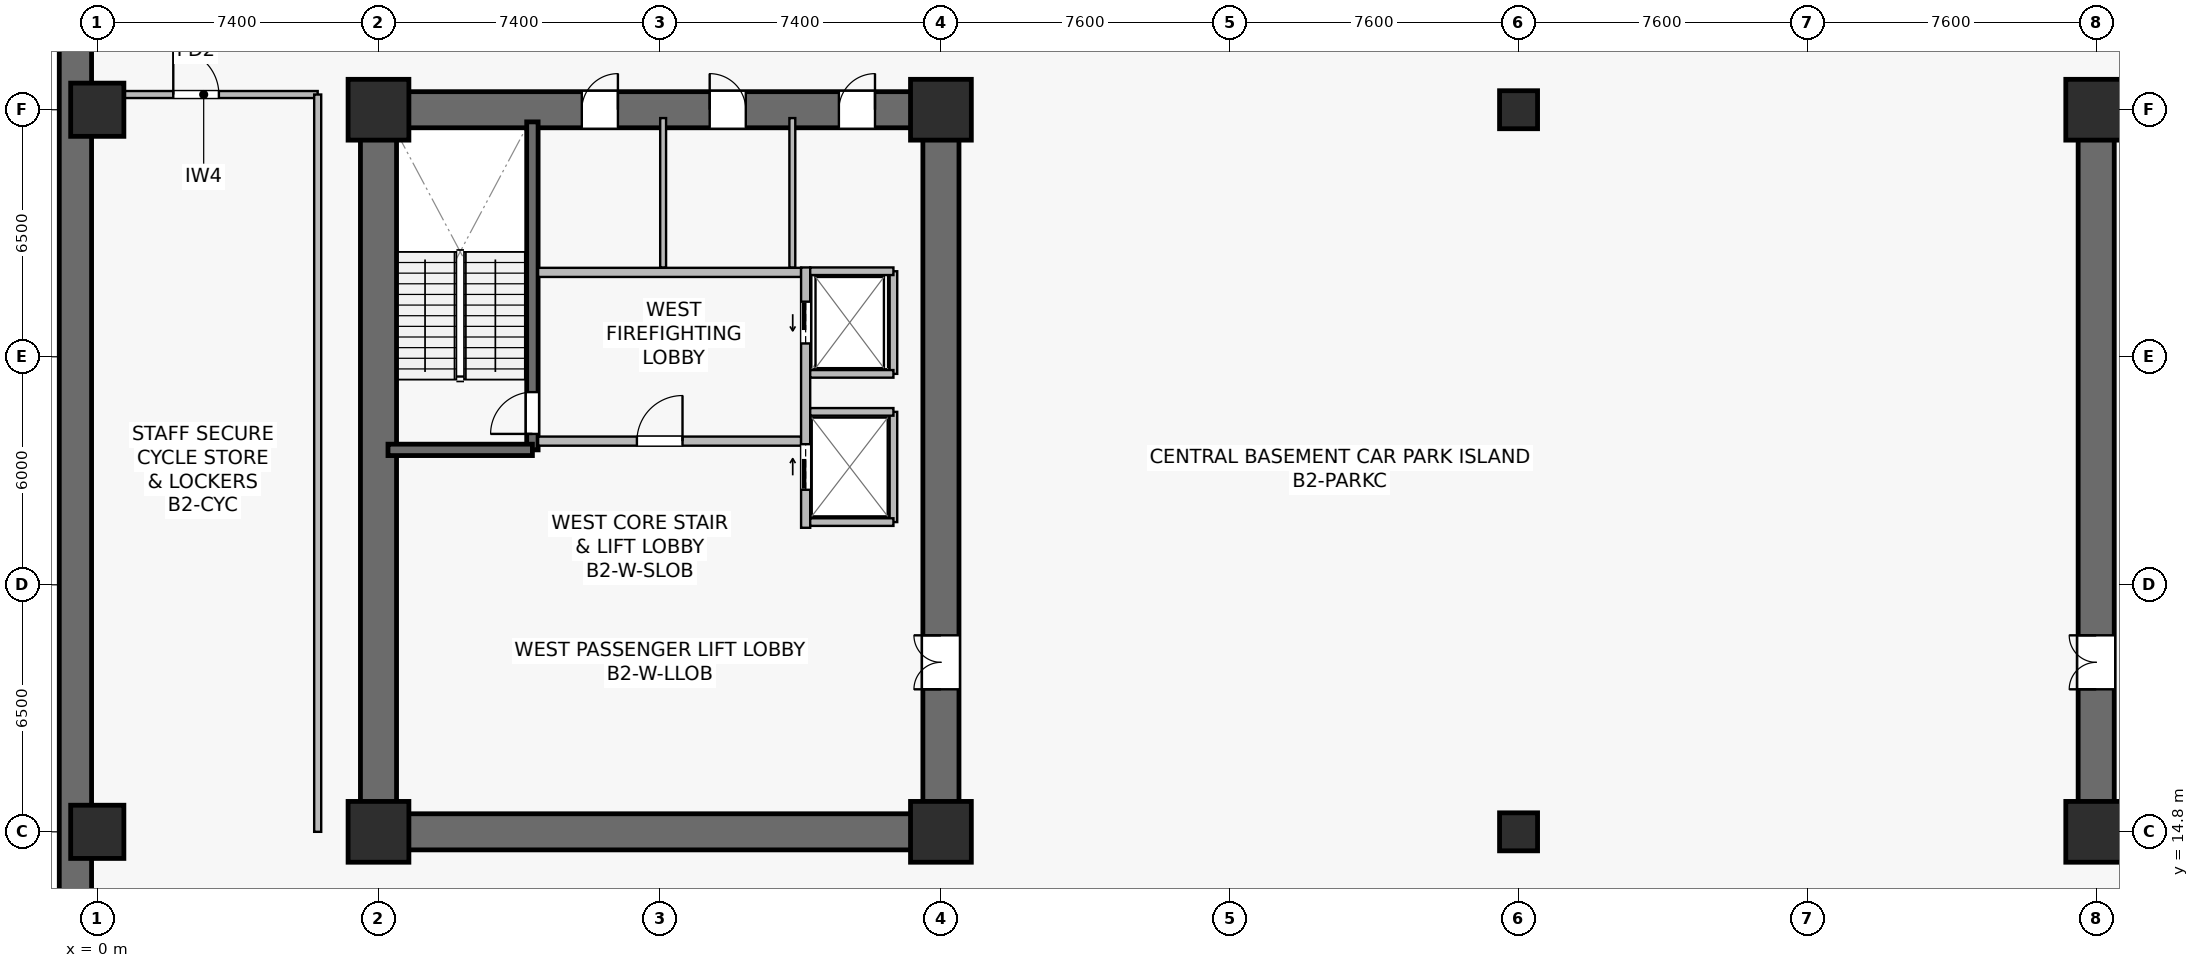
"""IFC4 building model, lengths in metres.
Left out: names, types, materials, properties, quantities, classifications, styles, units other than length and angle.
Written with IfcOpenShell. Run it as: python <this file> out.ifc"""

import sys

from ifc_helpers import new_model, si_unit, direction, frame, frame_2d, origin, origin_2d, place, context, subcontext, project, spatial, rectangle, extrude, source, transform, mapped, element, fill, save


model = new_model("IFC4")
c1 = context("Model", 3, precision=1e-05, world=origin(), true_north=direction((0.0, 1.0)))
c2 = subcontext(c1, "Body", "Model", "MODEL_VIEW")
j1 = project(units=[si_unit("LENGTHUNIT", "METRE"), si_unit("PLANEANGLEUNIT", "RADIAN")], contexts=[c1])
p1 = place(None, origin())
s1 = spatial("IfcSite", under=j1, at=p1, CompositionType="ELEMENT")
p2 = place(p1, origin())
s2 = spatial("IfcBuilding", under=s1, at=p2, CompositionType="ELEMENT")
p3 = place(p2, frame((0.0, 0.0, -9.6)))
s3 = spatial("IfcBuildingStorey", under=s2, at=p3, CompositionType="ELEMENT", Elevation=-9.6)
p4 = place(p3, frame((6.925, 14.8, 0.0), z_axis=(0.0, 0.0, 1.0), x_axis=(1.0, 0.0, 0.0)))
e1 = element("IfcWall", 1, at=p4, inside=s3, PredefinedType="SHEAR", context=c2, shape_type="SweptSolid", body=[
    extrude(rectangle(XDim=15.75, YDim=0.95, at=frame_2d((7.875, 0.0))), origin(), (0.0, 0.0, 1.0), 4.42),
])
p5 = place(p3, frame((6.925, 33.8, 0.0), z_axis=(0.0, 0.0, 1.0), x_axis=(1.0, 0.0, 0.0)))
e2 = element("IfcWall", 2, at=p5, inside=s3, PredefinedType="SHEAR", context=c2, shape_type="SweptSolid", body=[
    extrude(rectangle(XDim=15.75, YDim=0.95, at=frame_2d((7.875, 0.0))), origin(), (0.0, 0.0, 1.0), 4.42),
])
p6 = place(p5, frame((5.825, 0.0, 0.0)))
e3 = element("IfcOpeningElement", 3, at=p6, cuts=e2, PredefinedType="OPENING", context=c2, shape_type="SweptSolid", body=[
    extrude(rectangle(XDim=0.95, YDim=2.15, at=frame_2d((0.475, 1.075))), frame((0.0, 0.485, 0.0), z_axis=(0.0, -1.0, 0.0), x_axis=(1.0, 0.0, 0.0)), (0.0, 0.0, 1.0), 0.97),
])
p7 = place(p5, frame((9.19, 0.0, 0.0)))
e4 = element("IfcOpeningElement", 4, at=p7, cuts=e2, PredefinedType="OPENING", context=c2, shape_type="SweptSolid", body=[
    extrude(rectangle(XDim=0.95, YDim=2.15, at=frame_2d((0.475, 1.075))), frame((0.0, 0.485, 0.0), z_axis=(0.0, -1.0, 0.0), x_axis=(1.0, 0.0, 0.0)), (0.0, 0.0, 1.0), 0.97),
])
p8 = place(p5, frame((12.59, 0.0, 0.0)))
e5 = element("IfcOpeningElement", 5, at=p8, cuts=e2, PredefinedType="OPENING", context=c2, shape_type="SweptSolid", body=[
    extrude(rectangle(XDim=0.95, YDim=2.15, at=frame_2d((0.475, 1.075))), frame((0.0, 0.485, 0.0), z_axis=(0.0, -1.0, 0.0), x_axis=(1.0, 0.0, 0.0)), (0.0, 0.0, 1.0), 0.97),
])
p9 = place(p3, frame((7.4, 15.275, 0.0), z_axis=(0.0, 0.0, 1.0), x_axis=(0.0, 1.0, 0.0)))
e6 = element("IfcWall", 6, at=p9, inside=s3, PredefinedType="SHEAR", context=c2, shape_type="SweptSolid", body=[
    extrude(rectangle(XDim=18.05, YDim=0.95, at=frame_2d((9.025, 0.0))), origin(), (0.0, 0.0, 1.0), 4.42),
])
p10 = place(p3, frame((22.2, 15.275, 0.0), z_axis=(0.0, 0.0, 1.0), x_axis=(0.0, 1.0, 0.0)))
e7 = element("IfcWall", 7, at=p10, inside=s3, PredefinedType="SHEAR", context=c2, shape_type="SweptSolid", body=[
    extrude(rectangle(XDim=18.05, YDim=0.95, at=frame_2d((9.025, 0.0))), origin(), (0.0, 0.0, 1.0), 4.42),
])
p11 = place(p10, frame((3.275, 0.0, 0.0)))
e8 = element("IfcOpeningElement", 8, at=p11, cuts=e7, PredefinedType="OPENING", context=c2, shape_type="SweptSolid", body=[
    extrude(rectangle(XDim=1.42, YDim=2.2, at=frame_2d((0.71, 1.1))), frame((0.0, 0.485, 0.0), z_axis=(0.0, -1.0, 0.0), x_axis=(1.0, 0.0, 0.0)), (0.0, 0.0, 1.0), 0.97),
])
p12 = place(p3, frame((11.45, 24.85, 0.0), z_axis=(0.0, 0.0, 1.0), x_axis=(0.0, 1.0, 0.0)))
e9 = element("IfcWall", 9, at=p12, inside=s3, PredefinedType="SHEAR", context=c2, shape_type="SweptSolid", body=[
    extrude(rectangle(XDim=8.63, YDim=0.3, at=frame_2d((4.315, 0.0))), origin(), (0.0, 0.0, 1.0), 4.42),
])
p13 = place(p12, frame((0.42, 0.0, 0.0)))
e10 = element("IfcOpeningElement", 10, at=p13, cuts=e9, PredefinedType="OPENING", context=c2, shape_type="SweptSolid", body=[
    extrude(rectangle(XDim=1.1, YDim=2.15, at=frame_2d((0.55, 1.075))), frame((0.0, 0.16, 0.0), z_axis=(0.0, -1.0, 0.0), x_axis=(1.0, 0.0, 0.0)), (0.0, 0.0, 1.0), 0.32),
])
p14 = place(p3, frame((7.65, 24.85, 0.0), z_axis=(0.0, 0.0, 1.0), x_axis=(1.0, 0.0, 0.0)))
e11 = element("IfcWall", 11, at=p14, inside=s3, PredefinedType="SHEAR", context=c2, shape_type="SweptSolid", body=[
    extrude(rectangle(XDim=3.8, YDim=0.3, at=frame_2d((1.9, 0.0))), origin(), (0.0, 0.0, 1.0), 4.42),
])
p15 = place(p3, frame((52.125, 14.8, 0.0), z_axis=(0.0, 0.0, 1.0), x_axis=(1.0, 0.0, 0.0)))
e12 = element("IfcWall", 12, at=p15, inside=s3, PredefinedType="SHEAR", context=c2, shape_type="SweptSolid", body=[
    extrude(rectangle(XDim=15.75, YDim=0.95, at=frame_2d((7.875, 0.0))), origin(), (0.0, 0.0, 1.0), 4.42),
])
p16 = place(p3, frame((52.125, 33.8, 0.0), z_axis=(0.0, 0.0, 1.0), x_axis=(1.0, 0.0, 0.0)))
e13 = element("IfcWall", 13, at=p16, inside=s3, PredefinedType="SHEAR", context=c2, shape_type="SweptSolid", body=[
    extrude(rectangle(XDim=15.75, YDim=0.95, at=frame_2d((7.875, 0.0))), origin(), (0.0, 0.0, 1.0), 4.42),
])
p17 = place(p16, frame((8.975, 0.0, 0.0)))
e14 = element("IfcOpeningElement", 14, at=p17, cuts=e13, PredefinedType="OPENING", context=c2, shape_type="SweptSolid", body=[
    extrude(rectangle(XDim=0.95, YDim=2.15, at=frame_2d((0.475, 1.075))), frame((0.0, 0.485, 0.0), z_axis=(0.0, -1.0, 0.0), x_axis=(1.0, 0.0, 0.0)), (0.0, 0.0, 1.0), 0.97),
])
p18 = place(p16, frame((5.61, 0.0, 0.0)))
e15 = element("IfcOpeningElement", 15, at=p18, cuts=e13, PredefinedType="OPENING", context=c2, shape_type="SweptSolid", body=[
    extrude(rectangle(XDim=0.95, YDim=2.15, at=frame_2d((0.475, 1.075))), frame((0.0, 0.485, 0.0), z_axis=(0.0, -1.0, 0.0), x_axis=(1.0, 0.0, 0.0)), (0.0, 0.0, 1.0), 0.97),
])
p19 = place(p16, frame((2.21, 0.0, 0.0)))
e16 = element("IfcOpeningElement", 16, at=p19, cuts=e13, PredefinedType="OPENING", context=c2, shape_type="SweptSolid", body=[
    extrude(rectangle(XDim=0.95, YDim=2.15, at=frame_2d((0.475, 1.075))), frame((0.0, 0.485, 0.0), z_axis=(0.0, -1.0, 0.0), x_axis=(1.0, 0.0, 0.0)), (0.0, 0.0, 1.0), 0.97),
])
p20 = place(p3, frame((52.6, 15.275, 0.0), z_axis=(0.0, 0.0, 1.0), x_axis=(0.0, 1.0, 0.0)))
e17 = element("IfcWall", 17, at=p20, inside=s3, PredefinedType="SHEAR", context=c2, shape_type="SweptSolid", body=[
    extrude(rectangle(XDim=18.05, YDim=0.95, at=frame_2d((9.025, 0.0))), origin(), (0.0, 0.0, 1.0), 4.42),
])
p21 = place(p20, frame((3.275, 0.0, 0.0)))
e18 = element("IfcOpeningElement", 18, at=p21, cuts=e17, PredefinedType="OPENING", context=c2, shape_type="SweptSolid", body=[
    extrude(rectangle(XDim=1.42, YDim=2.2, at=frame_2d((0.71, 1.1))), frame((0.0, 0.485, 0.0), z_axis=(0.0, -1.0, 0.0), x_axis=(1.0, 0.0, 0.0)), (0.0, 0.0, 1.0), 0.97),
])
p22 = place(p3, frame((-0.575, 0.05, 0.0), z_axis=(0.0, 0.0, 1.0), x_axis=(0.0, 1.0, 0.0)))
e19 = element("IfcWall", 19, at=p22, inside=s3, PredefinedType="SOLIDWALL", context=c2, shape_type="SweptSolid", body=[
    extrude(rectangle(XDim=48.5, YDim=0.85, at=frame_2d((24.25, 0.0))), origin(), (0.0, 0.0, 1.0), 4.42),
])
m1 = source(origin(), c2, "Body", "SweptSolid", [
    extrude(rectangle(XDim=1.6, YDim=1.6, at=origin_2d()), origin(), (0.0, 0.0, 1.0), 4.8),
])
for number, where, z_axis, x_axis in (
    (20, (7.4, 14.8, 0.0), (0.0, 0.0, 1.0), (1.0, 0.0, 0.0)),
    (21, (22.2, 14.8, 0.0), (0.0, 0.0, 1.0), (1.0, 0.0, 0.0)),
    (22, (7.4, 33.8, 0.0), (0.0, 0.0, 1.0), (1.0, 0.0, 0.0)),
    (23, (22.2, 33.8, 0.0), (0.0, 0.0, 1.0), (1.0, 0.0, 0.0)),
    (24, (52.6, 14.8, 0.0), (0.0, 0.0, 1.0), (1.0, 0.0, 0.0)),
    (25, (52.6, 33.8, 0.0), (0.0, 0.0, 1.0), (1.0, 0.0, 0.0)),
):
    element("IfcColumn", number, at=place(p3, frame(where, z_axis=z_axis, x_axis=x_axis)), inside=s3, PredefinedType="COLUMN", context=c2, shape_type="MappedRepresentation", body=[
        mapped(m1, transform((0.0, 0.0, 0.0), scale=1.0)),
    ])
m2 = source(origin(), c2, "Body", "SweptSolid", [
    extrude(rectangle(XDim=1.4, YDim=1.4, at=origin_2d()), origin(), (0.0, 0.0, 1.0), 4.8),
])
for number, where, z_axis, x_axis in (
    (26, (0.0, 14.8, 0.0), (0.0, 0.0, 1.0), (1.0, 0.0, 0.0)),
    (27, (0.0, 33.8, 0.0), (0.0, 0.0, 1.0), (1.0, 0.0, 0.0)),
):
    element("IfcColumn", number, at=place(p3, frame(where, z_axis=z_axis, x_axis=x_axis)), inside=s3, PredefinedType="COLUMN", context=c2, shape_type="MappedRepresentation", body=[
        mapped(m2, transform((0.0, 0.0, 0.0), scale=1.0)),
    ])
m3 = source(origin(), c2, "Body", "SweptSolid", [
    extrude(rectangle(XDim=1.0, YDim=1.0, at=origin_2d()), origin(), (0.0, 0.0, 1.0), 4.8),
])
for number, where, z_axis, x_axis in (
    (28, (37.4, 14.8, 0.0), (0.0, 0.0, 1.0), (1.0, 0.0, 0.0)),
    (29, (37.4, 33.8, 0.0), (0.0, 0.0, 1.0), (1.0, 0.0, 0.0)),
):
    element("IfcColumn", number, at=place(p3, frame(where, z_axis=z_axis, x_axis=x_axis)), inside=s3, PredefinedType="COLUMN", context=c2, shape_type="MappedRepresentation", body=[
        mapped(m3, transform((0.0, 0.0, 0.0), scale=1.0)),
    ])
p23 = place(p3, frame((11.6, 25.08, 0.0), z_axis=(0.0, 0.0, 1.0), x_axis=(1.0, 0.0, 0.0)))
e30 = element("IfcWall", 30, at=p23, inside=s3, PredefinedType="SOLIDWALL", context=c2, shape_type="SweptSolid", body=[
    extrude(rectangle(XDim=6.92, YDim=0.24, at=frame_2d((3.46, 0.0))), origin(), (0.0, 0.0, 1.0), 3.655),
])
p24 = place(p23, frame((2.6, 0.0, 0.0)))
e31 = element("IfcOpeningElement", 31, at=p24, cuts=e30, PredefinedType="OPENING", context=c2, shape_type="SweptSolid", body=[
    extrude(rectangle(XDim=1.2, YDim=2.16, at=frame_2d((0.6, 1.08))), frame((0.0, 0.13, 0.0), z_axis=(0.0, -1.0, 0.0), x_axis=(1.0, 0.0, 0.0)), (0.0, 0.0, 1.0), 0.26),
])
p25 = place(p3, frame((11.6, 29.52, 0.0), z_axis=(0.0, 0.0, 1.0), x_axis=(1.0, 0.0, 0.0)))
e32 = element("IfcWall", 32, at=p25, inside=s3, PredefinedType="SOLIDWALL", context=c2, shape_type="SweptSolid", body=[
    extrude(rectangle(XDim=6.92, YDim=0.24, at=frame_2d((3.46, 0.0))), origin(), (0.0, 0.0, 1.0), 3.655),
])
p26 = place(p3, frame((18.64, 22.8, 0.0), z_axis=(0.0, 0.0, 1.0), x_axis=(0.0, 1.0, 0.0)))
e33 = element("IfcWall", 33, at=p26, inside=s3, PredefinedType="SOLIDWALL", context=c2, shape_type="SweptSolid", body=[
    extrude(rectangle(XDim=6.85, YDim=0.24, at=frame_2d((3.425, 0.0))), origin(), (0.0, 0.0, 1.0), 3.505),
])
p27 = place(p26, frame((4.85, 0.0, 0.0)))
e34 = element("IfcOpeningElement", 34, at=p27, cuts=e33, PredefinedType="OPENING", context=c2, shape_type="SweptSolid", body=[
    extrude(rectangle(XDim=1.1, YDim=2.22, at=frame_2d((0.55, 1.11))), frame((0.0, 0.13, 0.0), z_axis=(0.0, -1.0, 0.0), x_axis=(1.0, 0.0, 0.0)), (0.0, 0.0, 1.0), 0.26),
])
p28 = place(p26, frame((1.0, 0.0, 0.0)))
e35 = element("IfcOpeningElement", 35, at=p28, cuts=e33, PredefinedType="OPENING", context=c2, shape_type="SweptSolid", body=[
    extrude(rectangle(XDim=1.2, YDim=2.22, at=frame_2d((0.6, 1.11))), frame((0.0, 0.13, 0.0), z_axis=(0.0, -1.0, 0.0), x_axis=(1.0, 0.0, 0.0)), (0.0, 0.0, 1.0), 0.26),
])
p29 = place(p3, frame((20.95, 26.85, 0.0), z_axis=(0.0, 0.0, 1.0), x_axis=(0.0, 1.0, 0.0)))
e36 = element("IfcWall", 36, at=p29, inside=s3, PredefinedType="SOLIDWALL", context=c2, shape_type="SweptSolid", body=[
    extrude(rectangle(XDim=2.7, YDim=0.2, at=frame_2d((1.35, 0.0))), origin(), (0.0, 0.0, 1.0), 4.42),
])
p30 = place(p3, frame((18.76, 29.55, 0.0), z_axis=(0.0, 0.0, 1.0), x_axis=(1.0, 0.0, 0.0)))
e37 = element("IfcWall", 37, at=p30, inside=s3, PredefinedType="SOLIDWALL", context=c2, shape_type="SweptSolid", body=[
    extrude(rectangle(XDim=2.19, YDim=0.2, at=frame_2d((1.095, 0.0))), origin(), (0.0, 0.0, 1.0), 4.42),
])
p31 = place(p3, frame((18.76, 26.85, 0.0), z_axis=(0.0, 0.0, 1.0), x_axis=(1.0, 0.0, 0.0)))
e38 = element("IfcWall", 38, at=p31, inside=s3, PredefinedType="SOLIDWALL", context=c2, shape_type="SweptSolid", body=[
    extrude(rectangle(XDim=2.19, YDim=0.2, at=frame_2d((1.095, 0.0))), origin(), (0.0, 0.0, 1.0), 3.817),
])
p32 = place(p3, frame((20.95, 22.95, 0.0), z_axis=(0.0, 0.0, 1.0), x_axis=(0.0, 1.0, 0.0)))
e39 = element("IfcWall", 39, at=p32, inside=s3, PredefinedType="SOLIDWALL", context=c2, shape_type="SweptSolid", body=[
    extrude(rectangle(XDim=2.9, YDim=0.2, at=frame_2d((1.45, 0.0))), origin(), (0.0, 0.0, 1.0), 3.505),
])
for number, where, z_axis, x_axis in (
    (40, (18.76, 25.85, 0.0), (0.0, 0.0, 1.0), (1.0, 0.0, 0.0)),
    (41, (18.76, 22.95, 0.0), (0.0, 0.0, 1.0), (1.0, 0.0, 0.0)),
):
    element("IfcWall", number, at=place(p3, frame(where, z_axis=z_axis, x_axis=x_axis)), inside=s3, PredefinedType="SOLIDWALL", context=c2, shape_type="SweptSolid", body=[
        extrude(rectangle(XDim=2.19, YDim=0.2, at=frame_2d((1.095, 0.0))), origin(), (0.0, 0.0, 1.0), 4.42),
    ])
p33 = place(p3, frame((14.89, 29.65, 0.0), z_axis=(0.0, 0.0, 1.0), x_axis=(0.0, 1.0, 0.0)))
e42 = element("IfcWall", 42, at=p33, inside=s3, PredefinedType="PLUMBINGWALL", context=c2, shape_type="SweptSolid", body=[
    extrude(rectangle(XDim=3.93, YDim=0.155, at=frame_2d((1.965, 0.0))), origin(), (0.0, 0.0, 1.0), 3.655),
])
p34 = place(p3, frame((18.29, 29.65, 0.0), z_axis=(0.0, 0.0, 1.0), x_axis=(0.0, 1.0, 0.0)))
e43 = element("IfcWall", 43, at=p34, inside=s3, PredefinedType="PLUMBINGWALL", context=c2, shape_type="SweptSolid", body=[
    extrude(rectangle(XDim=3.93, YDim=0.155, at=frame_2d((1.965, 0.0))), origin(), (0.0, 0.0, 1.0), 4.42),
])
p35 = place(p3, frame((-0.2, 34.2, 0.0), z_axis=(0.0, 0.0, 1.0), x_axis=(1.0, 0.0, 0.0)))
e44 = element("IfcWall", 44, at=p35, inside=s3, PredefinedType="SOLIDWALL", context=c2, shape_type="SweptSolid", body=[
    extrude(rectangle(XDim=6.0, YDim=0.185, at=frame_2d((3.0, 0.0))), origin(), (0.0, 0.0, 1.0), 3.805),
])
p36 = place(p35, frame((2.2, 0.0, 0.0)))
e45 = element("IfcOpeningElement", 45, at=p36, cuts=e44, PredefinedType="OPENING", context=c2, shape_type="SweptSolid", body=[
    extrude(rectangle(XDim=1.2, YDim=2.16, at=frame_2d((0.6, 1.08))), frame((0.0, 0.103, 0.0), z_axis=(0.0, -1.0, 0.0), x_axis=(1.0, 0.0, 0.0)), (0.0, 0.0, 1.0), 0.205),
])
p37 = place(p3, frame((5.8, 14.8, 0.0), z_axis=(0.0, 0.0, 1.0), x_axis=(0.0, 1.0, 0.0)))
e46 = element("IfcWall", 46, at=p37, inside=s3, PredefinedType="SOLIDWALL", context=c2, shape_type="SweptSolid", body=[
    extrude(rectangle(XDim=19.4, YDim=0.185, at=frame_2d((9.7, 0.0))), origin(), (0.0, 0.0, 1.0), 3.605),
])
m4 = source(origin(), c2, "Body", "SweptSolid", [
    extrude(rectangle(XDim=1.1, YDim=2.15, at=frame_2d((0.55, 1.075))), frame((0.0, 0.025, 0.0), z_axis=(0.0, -1.0, 0.0), x_axis=(1.0, 0.0, 0.0)), (0.0, 0.0, 1.0), 0.05),
])
p38 = place(p13, origin())
e47 = element("IfcDoor", 47, at=p38, inside=s3, OperationType="SINGLE_SWING_LEFT", PredefinedType="DOOR", context=c2, shape_type="MappedRepresentation", body=[
    mapped(m4, transform((0.0, 0.0, 0.0), scale=1.0)),
])
fill(e10, e47)
m5 = source(origin(), c2, "Body", "SweptSolid", [
    extrude(rectangle(XDim=1.2, YDim=2.16, at=frame_2d((0.6, 1.08))), frame((0.0, 0.025, 0.0), z_axis=(0.0, -1.0, 0.0), x_axis=(1.0, 0.0, 0.0)), (0.0, 0.0, 1.0), 0.05),
])
p39 = place(p24, origin())
e48 = element("IfcDoor", 48, at=p39, inside=s3, OperationType="SINGLE_SWING_RIGHT", PredefinedType="DOOR", context=c2, shape_type="MappedRepresentation", body=[
    mapped(m5, transform((0.0, 0.0, 0.0), scale=1.0)),
])
fill(e31, e48)
m6 = source(origin(), c2, "Body", "SweptSolid", [
    extrude(rectangle(XDim=1.1, YDim=2.22, at=frame_2d((0.55, 1.11))), frame((0.0, 0.025, 0.0), z_axis=(0.0, -1.0, 0.0), x_axis=(1.0, 0.0, 0.0)), (0.0, 0.0, 1.0), 0.05),
])
p40 = place(p27, origin())
e49 = element("IfcDoor", 49, at=p40, inside=s3, OperationType="SLIDING_TO_LEFT", PredefinedType="USERDEFINED", context=c2, shape_type="MappedRepresentation", body=[
    mapped(m6, transform((0.0, 0.0, 0.0), scale=1.0)),
])
fill(e34, e49)
m7 = source(origin(), c2, "Body", "SweptSolid", [
    extrude(rectangle(XDim=1.2, YDim=2.22, at=frame_2d((0.6, 1.11))), frame((0.0, 0.025, 0.0), z_axis=(0.0, -1.0, 0.0), x_axis=(1.0, 0.0, 0.0)), (0.0, 0.0, 1.0), 0.05),
])
p41 = place(p28, origin())
e50 = element("IfcDoor", 50, at=p41, inside=s3, OperationType="SLIDING_TO_RIGHT", PredefinedType="USERDEFINED", context=c2, shape_type="MappedRepresentation", body=[
    mapped(m7, transform((0.0, 0.0, 0.0), scale=1.0)),
])
fill(e35, e50)
m8 = source(origin(), c2, "Body", "SweptSolid", [
    extrude(rectangle(XDim=1.42, YDim=2.2, at=frame_2d((0.71, 1.1))), frame((0.0, 0.025, 0.0), z_axis=(0.0, -1.0, 0.0), x_axis=(1.0, 0.0, 0.0)), (0.0, 0.0, 1.0), 0.05),
])
p42 = place(p11, origin())
e51 = element("IfcDoor", 51, at=p42, inside=s3, OperationType="DOUBLE_DOOR_SINGLE_SWING", PredefinedType="DOOR", context=c2, shape_type="MappedRepresentation", body=[
    mapped(m8, transform((0.0, 0.0, 0.0), scale=1.0)),
])
fill(e8, e51)
m9 = source(origin(), c2, "Body", "SweptSolid", [
    extrude(rectangle(XDim=0.95, YDim=2.15, at=frame_2d((0.475, 1.075))), frame((0.0, 0.025, 0.0), z_axis=(0.0, -1.0, 0.0), x_axis=(1.0, 0.0, 0.0)), (0.0, 0.0, 1.0), 0.05),
])
p43 = place(p6, origin())
e52 = element("IfcDoor", 52, at=p43, inside=s3, OperationType="SINGLE_SWING_RIGHT", PredefinedType="DOOR", context=c2, shape_type="MappedRepresentation", body=[
    mapped(m9, transform((0.0, 0.0, 0.0), scale=1.0)),
])
fill(e3, e52)
p44 = place(p7, origin())
e53 = element("IfcDoor", 53, at=p44, inside=s3, OperationType="SINGLE_SWING_LEFT", PredefinedType="DOOR", context=c2, shape_type="MappedRepresentation", body=[
    mapped(m9, transform((0.0, 0.0, 0.0), scale=1.0)),
])
fill(e4, e53)
p45 = place(p8, origin())
e54 = element("IfcDoor", 54, at=p45, inside=s3, OperationType="SINGLE_SWING_RIGHT", PredefinedType="DOOR", context=c2, shape_type="MappedRepresentation", body=[
    mapped(m9, transform((0.0, 0.0, 0.0), scale=1.0)),
])
fill(e5, e54)
p46 = place(p21, origin())
e55 = element("IfcDoor", 55, at=p46, inside=s3, OperationType="DOUBLE_DOOR_SINGLE_SWING", PredefinedType="DOOR", context=c2, shape_type="MappedRepresentation", body=[
    mapped(m8, transform((0.0, 0.0, 0.0), scale=1.0)),
])
fill(e18, e55)
p47 = place(p36, origin())
e56 = element("IfcDoor", 56, at=p47, inside=s3, OperationType="SINGLE_SWING_LEFT", PredefinedType="DOOR", context=c2, shape_type="MappedRepresentation", body=[
    mapped(m5, transform((0.0, 0.0, 0.0), scale=1.0)),
])
fill(e45, e56)
save(model, sys.argv[1])
